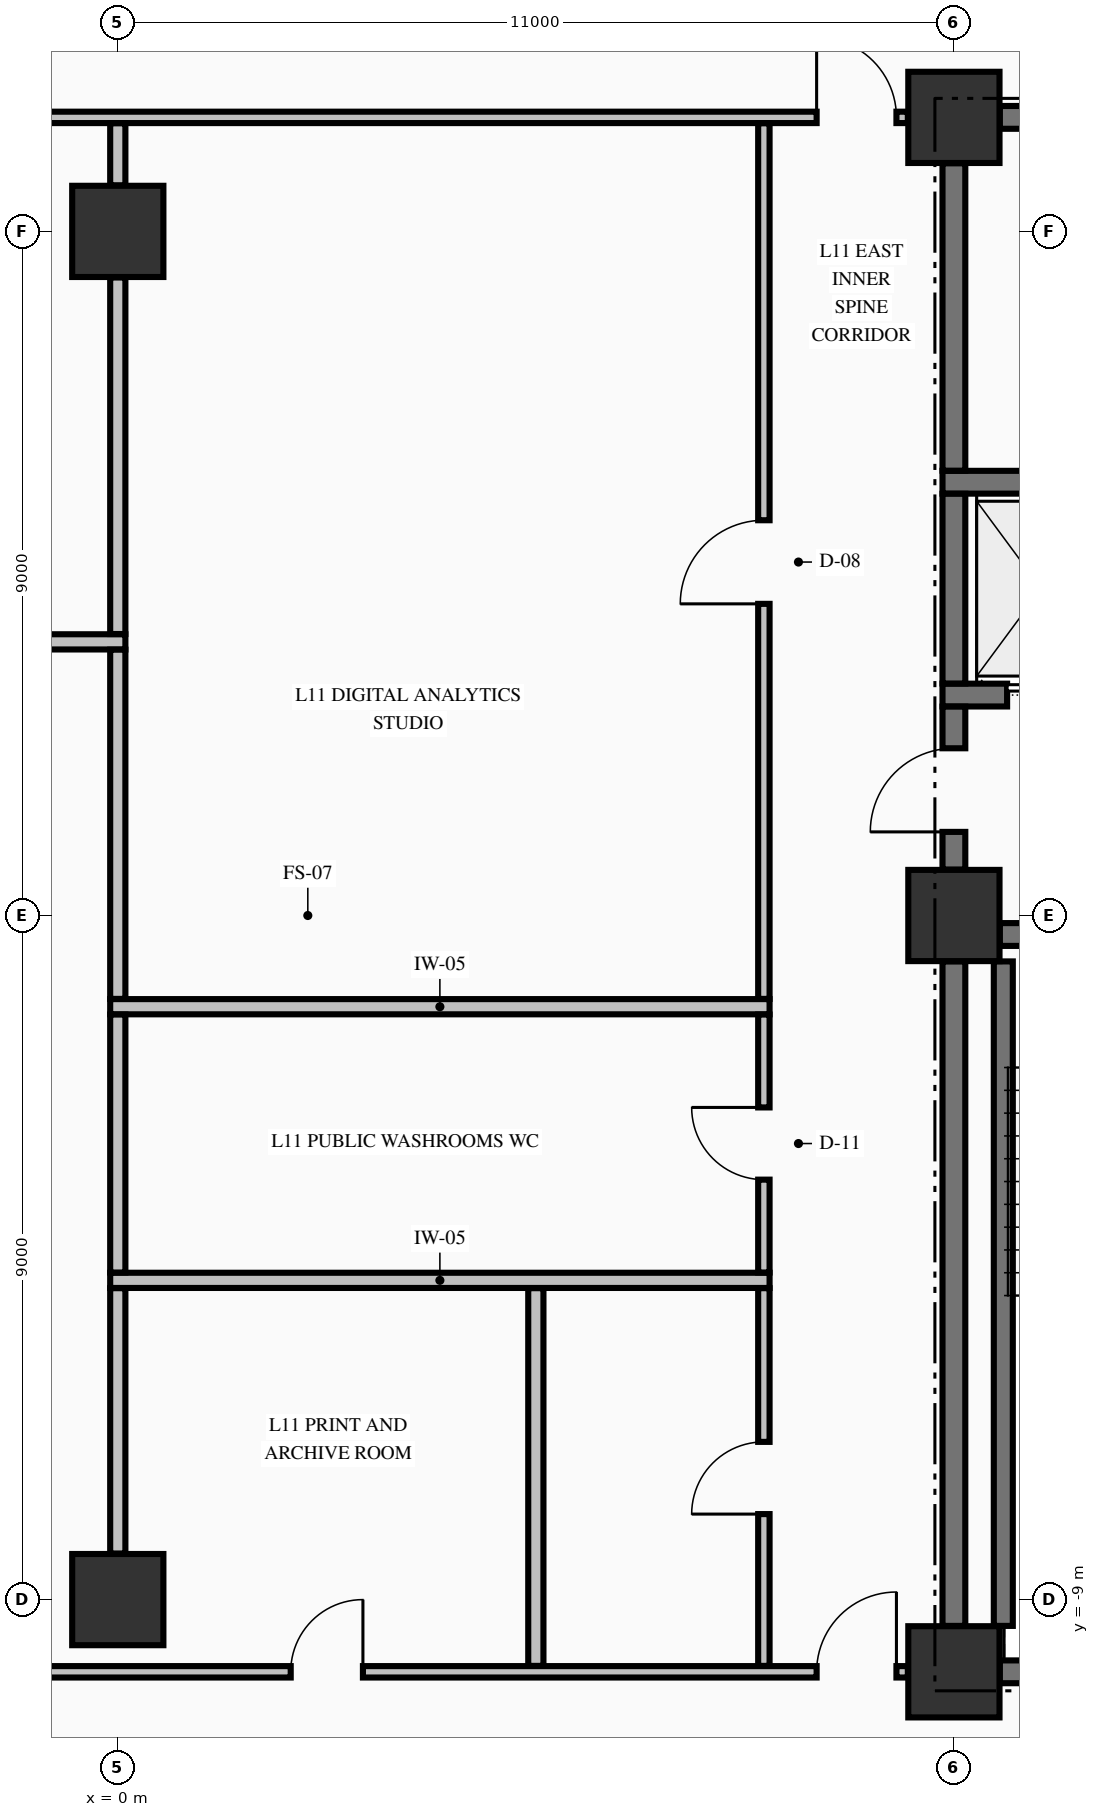
"""IFC4 building model, lengths in metres.
Left out: names, types, materials, properties, quantities, classifications, styles, units other than length and angle.
Written with IfcOpenShell. Run it as: python <this file> out.ifc"""

import sys

from ifc_helpers import new_model, si_unit, direction, frame, frame_2d, origin, origin_2d, place, context, subcontext, project, spatial, rectangle, extrude, element, fill, save


model = new_model("IFC4")
c1 = context("Model", 3, precision=1e-05, world=origin(), true_north=direction((0.0, 1.0)))
c2 = subcontext(c1, "Body", "Model", "MODEL_VIEW")
j1 = project(units=[si_unit("LENGTHUNIT", "METRE"), si_unit("PLANEANGLEUNIT", "RADIAN")], contexts=[c1])
p1 = place(None, origin())
s1 = spatial("IfcSite", under=j1, at=p1, CompositionType="ELEMENT")
p2 = place(p1, origin())
s2 = spatial("IfcBuilding", under=s1, at=p2, CompositionType="ELEMENT")
p3 = place(p2, frame((0.0, 0.0, 48.62)))
s3 = spatial("IfcBuildingStorey", under=s2, at=p3, CompositionType="ELEMENT", Elevation=48.62)
for number, where, z_axis, x_axis in (
    (1, (11.0, -9.95, -0.25), (0.0, 0.0, 1.0), (1.0, 0.0, 0.0)),
    (2, (11.0, 0.0, -0.25), (0.0, 0.0, 1.0), (1.0, 0.0, 0.0)),
    (3, (11.0, 10.5, -0.25), (0.0, 0.0, 1.0), (1.0, 0.0, 0.0)),
    (4, (0.0, -9.0, -0.25), (0.0, 0.0, 1.0), (1.0, 0.0, 0.0)),
    (5, (0.0, 9.0, -0.25), (0.0, 0.0, 1.0), (1.0, 0.0, 0.0)),
):
    element("IfcColumn", number, at=place(p3, frame(where, z_axis=z_axis, x_axis=x_axis)), inside=s3, PredefinedType="COLUMN", context=c2, shape_type="SweptSolid", body=[
        extrude(rectangle(XDim=1.2, YDim=1.2, at=origin_2d()), origin(), (0.0, 0.0, 1.0), 3.395),
    ])
p4 = place(p3, frame((11.604, -9.95, 0.0), z_axis=(0.0, 0.0, 1.0), x_axis=(1.0, 0.0, 0.0)))
e6 = element("IfcWall", 6, at=p4, inside=s3, PredefinedType="SHEAR", context=c2, shape_type="SweptSolid", body=[
    extrude(rectangle(XDim=3.096, YDim=0.3, at=frame_2d((1.548, 0.0))), origin(), (0.0, 0.0, 1.0), 3.145),
])
p5 = place(p3, frame((11.604, -0.25, 0.0), z_axis=(0.0, 0.0, 1.0), x_axis=(1.0, 0.0, 0.0)))
e7 = element("IfcWall", 7, at=p5, inside=s3, PredefinedType="SHEAR", context=c2, shape_type="SweptSolid", body=[
    extrude(rectangle(XDim=3.271, YDim=0.3, at=frame_2d((1.635, 0.0))), origin(), (0.0, 0.0, 1.0), 3.145),
])
p6 = place(p5, frame((0.996, 0.0, 0.0)))
e8 = element("IfcOpeningElement", 8, at=p6, cuts=e7, PredefinedType="OPENING", context=c2, shape_type="SweptSolid", body=[
    extrude(rectangle(XDim=1.1, YDim=2.15, at=frame_2d((0.55, 1.075))), frame((0.0, 0.16, 0.0), z_axis=(0.0, -1.0, 0.0), x_axis=(1.0, 0.0, 0.0)), (0.0, 0.0, 1.0), 0.32),
])
p7 = place(p3, frame((10.85, 2.9, 0.0), z_axis=(0.0, 0.0, 1.0), x_axis=(1.0, 0.0, 0.0)))
e9 = element("IfcWall", 9, at=p7, inside=s3, PredefinedType="SHEAR", context=c2, shape_type="SweptSolid", body=[
    extrude(rectangle(XDim=4.025, YDim=0.3, at=frame_2d((2.012, 0.0))), origin(), (0.0, 0.0, 1.0), 3.145),
])
p8 = place(p7, frame((0.85, 0.0, 0.0)))
e10 = element("IfcOpeningElement", 10, at=p8, cuts=e9, PredefinedType="OPENING", context=c2, shape_type="SweptSolid", body=[
    extrude(rectangle(XDim=1.1, YDim=2.2, at=frame_2d((0.55, 1.1))), frame((0.0, 0.16, 0.0), z_axis=(0.0, -1.0, 0.0), x_axis=(1.0, 0.0, 0.0)), (0.0, 0.0, 1.0), 0.32),
])
p9 = place(p3, frame((10.85, 5.7, 0.0), z_axis=(0.0, 0.0, 1.0), x_axis=(1.0, 0.0, 0.0)))
e11 = element("IfcWall", 11, at=p9, inside=s3, PredefinedType="SHEAR", context=c2, shape_type="SweptSolid", body=[
    extrude(rectangle(XDim=4.025, YDim=0.3, at=frame_2d((2.012, 0.0))), origin(), (0.0, 0.0, 1.0), 3.145),
])
p10 = place(p3, frame((11.604, 10.5, 0.0), z_axis=(0.0, 0.0, 1.0), x_axis=(1.0, 0.0, 0.0)))
e12 = element("IfcWall", 12, at=p10, inside=s3, PredefinedType="SHEAR", context=c2, shape_type="SweptSolid", body=[
    extrude(rectangle(XDim=3.096, YDim=0.3, at=frame_2d((1.548, 0.0))), origin(), (0.0, 0.0, 1.0), 3.145),
])
p11 = place(p10, frame((1.371, 0.0, 0.0)))
e13 = element("IfcOpeningElement", 13, at=p11, cuts=e12, PredefinedType="OPENING", context=c2, shape_type="SweptSolid", body=[
    extrude(rectangle(XDim=0.95, YDim=2.15, at=frame_2d((0.475, 1.075))), frame((0.0, 0.16, 0.0), z_axis=(0.0, -1.0, 0.0), x_axis=(1.0, 0.0, 0.0)), (0.0, 0.0, 1.0), 0.32),
])
p12 = place(p3, frame((-10.394, -9.95, 0.0), z_axis=(0.0, 0.0, 1.0), x_axis=(1.0, 0.0, 0.0)))
e14 = element("IfcWall", 14, at=p12, inside=s3, PredefinedType="PARTITIONING", context=c2, shape_type="SweptSolid", body=[
    extrude(rectangle(XDim=20.788, YDim=0.15, at=frame_2d((10.394, 0.0))), origin(), (0.0, 0.0, 1.0), 3.145),
])
p13 = place(p12, frame((0.15, 0.0, 0.0)))
e15 = element("IfcOpeningElement", 15, at=p13, cuts=e14, PredefinedType="OPENING", context=c2, shape_type="SweptSolid", body=[
    extrude(rectangle(XDim=1.05, YDim=2.15, at=frame_2d((0.525, 1.075))), frame((0.0, 0.085, 0.0), z_axis=(0.0, -1.0, 0.0), x_axis=(1.0, 0.0, 0.0)), (0.0, 0.0, 1.0), 0.17),
])
p14 = place(p12, frame((19.588, 0.0, 0.0)))
e16 = element("IfcOpeningElement", 16, at=p14, cuts=e14, PredefinedType="OPENING", context=c2, shape_type="SweptSolid", body=[
    extrude(rectangle(XDim=1.05, YDim=2.15, at=frame_2d((0.525, 1.075))), frame((0.0, 0.085, 0.0), z_axis=(0.0, -1.0, 0.0), x_axis=(1.0, 0.0, 0.0)), (0.0, 0.0, 1.0), 0.17),
])
p15 = place(p12, frame((12.669, 0.0, 0.0)))
e17 = element("IfcOpeningElement", 17, at=p15, cuts=e14, PredefinedType="OPENING", context=c2, shape_type="SweptSolid", body=[
    extrude(rectangle(XDim=0.95, YDim=2.15, at=frame_2d((0.475, 1.075))), frame((0.0, 0.085, 0.0), z_axis=(0.0, -1.0, 0.0), x_axis=(1.0, 0.0, 0.0)), (0.0, 0.0, 1.0), 0.17),
])
for number, where, z_axis, x_axis in (
    (18, (-0.1, -4.8, 0.0), (0.0, 0.0, 1.0), (1.0, 0.0, 0.0)),
    (19, (-0.1, -1.2, 0.0), (0.0, 0.0, 1.0), (1.0, 0.0, 0.0)),
    (20, (-8.575, 3.6, 0.0), (0.0, 0.0, 1.0), (1.0, 0.0, 0.0)),
):
    element("IfcWall", number, at=place(p3, frame(where, z_axis=z_axis, x_axis=x_axis)), inside=s3, PredefinedType="PARTITIONING", context=c2, shape_type="SweptSolid", body=[
        extrude(rectangle(XDim=8.675, YDim=0.2, at=frame_2d((4.337, 0.0))), origin(), (0.0, 0.0, 1.0), 3.145),
    ])
p16 = place(p3, frame((-10.394, 10.5, 0.0), z_axis=(0.0, 0.0, 1.0), x_axis=(1.0, 0.0, 0.0)))
e21 = element("IfcWall", 21, at=p16, inside=s3, PredefinedType="PARTITIONING", context=c2, shape_type="SweptSolid", body=[
    extrude(rectangle(XDim=20.788, YDim=0.15, at=frame_2d((10.394, 0.0))), origin(), (0.0, 0.0, 1.0), 3.145),
])
p17 = place(p16, frame((0.15, 0.0, 0.0)))
e22 = element("IfcOpeningElement", 22, at=p17, cuts=e21, PredefinedType="OPENING", context=c2, shape_type="SweptSolid", body=[
    extrude(rectangle(XDim=1.05, YDim=2.15, at=frame_2d((0.525, 1.075))), frame((0.0, 0.085, 0.0), z_axis=(0.0, -1.0, 0.0), x_axis=(1.0, 0.0, 0.0)), (0.0, 0.0, 1.0), 0.17),
])
p18 = place(p16, frame((19.588, 0.0, 0.0)))
e23 = element("IfcOpeningElement", 23, at=p18, cuts=e21, PredefinedType="OPENING", context=c2, shape_type="SweptSolid", body=[
    extrude(rectangle(XDim=1.05, YDim=2.15, at=frame_2d((0.525, 1.075))), frame((0.0, 0.085, 0.0), z_axis=(0.0, -1.0, 0.0), x_axis=(1.0, 0.0, 0.0)), (0.0, 0.0, 1.0), 0.17),
])
p19 = place(p3, frame((11.0, -9.346, 0.0), z_axis=(0.0, 0.0, 1.0), x_axis=(0.0, 1.0, 0.0)))
e24 = element("IfcWall", 24, at=p19, inside=s3, PredefinedType="SHEAR", context=c2, shape_type="SweptSolid", body=[
    extrude(rectangle(XDim=8.742, YDim=0.3, at=frame_2d((4.371, 0.0))), origin(), (0.0, 0.0, 1.0), 3.145),
])
p20 = place(p3, frame((11.0, 0.604, 0.0), z_axis=(0.0, 0.0, 1.0), x_axis=(0.0, 1.0, 0.0)))
e25 = element("IfcWall", 25, at=p20, inside=s3, PredefinedType="SHEAR", context=c2, shape_type="SweptSolid", body=[
    extrude(rectangle(XDim=2.144, YDim=0.3, at=frame_2d((1.072, 0.0))), origin(), (0.0, 0.0, 1.0), 3.145),
])
p21 = place(p20, frame((0.496, 0.0, 0.0)))
e26 = element("IfcOpeningElement", 26, at=p21, cuts=e25, PredefinedType="OPENING", context=c2, shape_type="SweptSolid", body=[
    extrude(rectangle(XDim=1.1, YDim=2.15, at=frame_2d((0.55, 1.075))), frame((0.0, 0.16, 0.0), z_axis=(0.0, -1.0, 0.0), x_axis=(1.0, 0.0, 0.0)), (0.0, 0.0, 1.0), 0.32),
])
p22 = place(p3, frame((11.0, 3.052, 0.0), z_axis=(0.0, 0.0, 1.0), x_axis=(0.0, 1.0, 0.0)))
e27 = element("IfcWall", 27, at=p22, inside=s3, PredefinedType="SHEAR", context=c2, shape_type="SweptSolid", body=[
    extrude(rectangle(XDim=2.496, YDim=0.3, at=frame_2d((1.248, 0.0))), origin(), (0.0, 0.0, 1.0), 3.145),
])
p23 = place(p3, frame((11.0, 5.852, 0.0), z_axis=(0.0, 0.0, 1.0), x_axis=(0.0, 1.0, 0.0)))
e28 = element("IfcWall", 28, at=p23, inside=s3, PredefinedType="SHEAR", context=c2, shape_type="SweptSolid", body=[
    extrude(rectangle(XDim=4.044, YDim=0.3, at=frame_2d((2.022, 0.0))), origin(), (0.0, 0.0, 1.0), 3.145),
])
p24 = place(p3, frame((11.65, -9.346, 0.0), z_axis=(0.0, 0.0, 1.0), x_axis=(0.0, 1.0, 0.0)))
e29 = element("IfcWall", 29, at=p24, inside=s3, PredefinedType="SOLIDWALL", context=c2, shape_type="SweptSolid", body=[
    extrude(rectangle(XDim=8.742, YDim=0.25, at=frame_2d((4.371, 0.0))), origin(), (0.0, 0.0, 1.0), 3.145),
])
p25 = place(p3, frame((0.0, -8.394, 0.0), z_axis=(0.0, 0.0, 1.0), x_axis=(0.0, 1.0, 0.0)))
e30 = element("IfcWall", 30, at=p25, inside=s3, PredefinedType="PARTITIONING", context=c2, shape_type="SweptSolid", body=[
    extrude(rectangle(XDim=3.491, YDim=0.2, at=frame_2d((1.746, 0.0))), origin(), (0.0, 0.0, 1.0), 2.485),
])
p26 = place(p3, frame((0.0, -4.697, 0.0), z_axis=(0.0, 0.0, 1.0), x_axis=(0.0, 1.0, 0.0)))
e31 = element("IfcWall", 31, at=p26, inside=s3, PredefinedType="PARTITIONING", context=c2, shape_type="SweptSolid", body=[
    extrude(rectangle(XDim=3.394, YDim=0.2, at=frame_2d((1.697, 0.0))), origin(), (0.0, 0.0, 1.0), 2.485),
])
p27 = place(p3, frame((0.0, -1.097, 0.0), z_axis=(0.0, 0.0, 1.0), x_axis=(0.0, 1.0, 0.0)))
e32 = element("IfcWall", 32, at=p27, inside=s3, PredefinedType="PARTITIONING", context=c2, shape_type="SweptSolid", body=[
    extrude(rectangle(XDim=4.594, YDim=0.2, at=frame_2d((2.297, 0.0))), origin(), (0.0, 0.0, 1.0), 2.485),
])
p28 = place(p3, frame((0.0, 3.703, 0.0), z_axis=(0.0, 0.0, 1.0), x_axis=(0.0, 1.0, 0.0)))
e33 = element("IfcWall", 33, at=p28, inside=s3, PredefinedType="PARTITIONING", context=c2, shape_type="SweptSolid", body=[
    extrude(rectangle(XDim=4.691, YDim=0.2, at=frame_2d((2.346, 0.0))), origin(), (0.0, 0.0, 1.0), 2.485),
])
p29 = place(p3, frame((0.0, 9.606, 0.0), z_axis=(0.0, 0.0, 1.0), x_axis=(0.0, 1.0, 0.0)))
e34 = element("IfcWall", 34, at=p29, inside=s3, PredefinedType="PARTITIONING", context=c2, shape_type="SweptSolid", body=[
    extrude(rectangle(XDim=0.816, YDim=0.2, at=frame_2d((0.408, 0.0))), origin(), (0.0, 0.0, 1.0), 2.485),
])
p30 = place(p3, frame((5.5, -9.872, 0.0), z_axis=(0.0, 0.0, 1.0), x_axis=(0.0, 1.0, 0.0)))
e35 = element("IfcWall", 35, at=p30, inside=s3, PredefinedType="PARTITIONING", context=c2, shape_type="SweptSolid", body=[
    extrude(rectangle(XDim=4.969, YDim=0.2, at=frame_2d((2.484, 0.0))), origin(), (0.0, 0.0, 1.0), 3.145),
])
p31 = place(p3, frame((8.5, -9.872, 0.0), z_axis=(0.0, 0.0, 1.0), x_axis=(0.0, 1.0, 0.0)))
e36 = element("IfcWall", 36, at=p31, inside=s3, PredefinedType="PARTITIONING", context=c2, shape_type="SweptSolid", body=[
    extrude(rectangle(XDim=4.969, YDim=0.15, at=frame_2d((2.484, 0.0))), origin(), (0.0, 0.0, 1.0), 3.145),
])
p32 = place(p31, frame((1.997, 0.0, 0.0)))
e37 = element("IfcOpeningElement", 37, at=p32, cuts=e36, PredefinedType="OPENING", context=c2, shape_type="SweptSolid", body=[
    extrude(rectangle(XDim=0.95, YDim=2.15, at=frame_2d((0.475, 1.075))), frame((0.0, 0.085, 0.0), z_axis=(0.0, -1.0, 0.0), x_axis=(1.0, 0.0, 0.0)), (0.0, 0.0, 1.0), 0.17),
])
p33 = place(p3, frame((8.5, -4.697, 0.0), z_axis=(0.0, 0.0, 1.0), x_axis=(0.0, 1.0, 0.0)))
e38 = element("IfcWall", 38, at=p33, inside=s3, PredefinedType="PARTITIONING", context=c2, shape_type="SweptSolid", body=[
    extrude(rectangle(XDim=3.394, YDim=0.15, at=frame_2d((1.697, 0.0))), origin(), (0.0, 0.0, 1.0), 3.145),
])
p34 = place(p33, frame((1.222, 0.0, 0.0)))
e39 = element("IfcOpeningElement", 39, at=p34, cuts=e38, PredefinedType="OPENING", context=c2, shape_type="SweptSolid", body=[
    extrude(rectangle(XDim=0.95, YDim=2.15, at=frame_2d((0.475, 1.075))), frame((0.0, 0.085, 0.0), z_axis=(0.0, -1.0, 0.0), x_axis=(1.0, 0.0, 0.0)), (0.0, 0.0, 1.0), 0.17),
])
p35 = place(p3, frame((8.5, -1.097, 0.0), z_axis=(0.0, 0.0, 1.0), x_axis=(0.0, 1.0, 0.0)))
e40 = element("IfcWall", 40, at=p35, inside=s3, PredefinedType="PARTITIONING", context=c2, shape_type="SweptSolid", body=[
    extrude(rectangle(XDim=11.519, YDim=0.15, at=frame_2d((5.76, 0.0))), origin(), (0.0, 0.0, 1.0), 3.145),
])
p36 = place(p35, frame((5.197, 0.0, 0.0)))
e41 = element("IfcOpeningElement", 41, at=p36, cuts=e40, PredefinedType="OPENING", context=c2, shape_type="SweptSolid", body=[
    extrude(rectangle(XDim=1.1, YDim=2.15, at=frame_2d((0.55, 1.075))), frame((0.0, 0.085, 0.0), z_axis=(0.0, -1.0, 0.0), x_axis=(1.0, 0.0, 0.0)), (0.0, 0.0, 1.0), 0.17),
])
p37 = place(p21, origin())
e42 = element("IfcDoor", 42, at=p37, inside=s3, OperationType="SINGLE_SWING_LEFT", PredefinedType="DOOR", context=c2, shape_type="SweptSolid", body=[
    extrude(rectangle(XDim=1.1, YDim=2.15, at=frame_2d((0.55, 1.075))), frame((0.0, 0.025, 0.0), z_axis=(0.0, -1.0, 0.0), x_axis=(1.0, 0.0, 0.0)), (0.0, 0.0, 1.0), 0.05),
])
fill(e26, e42)
p38 = place(p8, origin())
e43 = element("IfcDoor", 43, at=p38, inside=s3, OperationType="SLIDING_TO_RIGHT", PredefinedType="DOOR", context=c2, shape_type="SweptSolid", body=[
    extrude(rectangle(XDim=1.1, YDim=2.2, at=frame_2d((0.55, 1.1))), frame((0.0, 0.025, 0.0), z_axis=(0.0, -1.0, 0.0), x_axis=(1.0, 0.0, 0.0)), (0.0, 0.0, 1.0), 0.05),
])
fill(e10, e43)
p39 = place(p18, origin())
e44 = element("IfcDoor", 44, at=p39, inside=s3, OperationType="SINGLE_SWING_LEFT", PredefinedType="DOOR", context=c2, shape_type="SweptSolid", body=[
    extrude(rectangle(XDim=1.05, YDim=2.15, at=frame_2d((0.525, 1.075))), frame((0.0, 0.025, 0.0), z_axis=(0.0, -1.0, 0.0), x_axis=(1.0, 0.0, 0.0)), (0.0, 0.0, 1.0), 0.05),
])
fill(e23, e44)
p40 = place(p14, origin())
e45 = element("IfcDoor", 45, at=p40, inside=s3, OperationType="SINGLE_SWING_RIGHT", PredefinedType="DOOR", context=c2, shape_type="SweptSolid", body=[
    extrude(rectangle(XDim=1.05, YDim=2.15, at=frame_2d((0.525, 1.075))), frame((0.0, 0.025, 0.0), z_axis=(0.0, -1.0, 0.0), x_axis=(1.0, 0.0, 0.0)), (0.0, 0.0, 1.0), 0.05),
])
fill(e16, e45)
p41 = place(p36, origin())
e46 = element("IfcDoor", 46, at=p41, inside=s3, OperationType="SINGLE_SWING_LEFT", PredefinedType="DOOR", context=c2, shape_type="SweptSolid", body=[
    extrude(rectangle(XDim=1.1, YDim=2.15, at=frame_2d((0.55, 1.075))), frame((0.0, 0.025, 0.0), z_axis=(0.0, -1.0, 0.0), x_axis=(1.0, 0.0, 0.0)), (0.0, 0.0, 1.0), 0.05),
])
fill(e41, e46)
p42 = place(p34, origin())
e47 = element("IfcDoor", 47, at=p42, inside=s3, OperationType="SINGLE_SWING_RIGHT", PredefinedType="DOOR", context=c2, shape_type="SweptSolid", body=[
    extrude(rectangle(XDim=0.95, YDim=2.15, at=frame_2d((0.475, 1.075))), frame((0.0, 0.025, 0.0), z_axis=(0.0, -1.0, 0.0), x_axis=(1.0, 0.0, 0.0)), (0.0, 0.0, 1.0), 0.05),
])
fill(e39, e47)
p43 = place(p32, origin())
e48 = element("IfcDoor", 48, at=p43, inside=s3, OperationType="SINGLE_SWING_LEFT", PredefinedType="DOOR", context=c2, shape_type="SweptSolid", body=[
    extrude(rectangle(XDim=0.95, YDim=2.15, at=frame_2d((0.475, 1.075))), frame((0.0, 0.025, 0.0), z_axis=(0.0, -1.0, 0.0), x_axis=(1.0, 0.0, 0.0)), (0.0, 0.0, 1.0), 0.05),
])
fill(e37, e48)
p44 = place(p15, origin())
e49 = element("IfcDoor", 49, at=p44, inside=s3, OperationType="SINGLE_SWING_RIGHT", PredefinedType="DOOR", context=c2, shape_type="SweptSolid", body=[
    extrude(rectangle(XDim=0.95, YDim=2.15, at=frame_2d((0.475, 1.075))), frame((0.0, 0.025, 0.0), z_axis=(0.0, -1.0, 0.0), x_axis=(1.0, 0.0, 0.0)), (0.0, 0.0, 1.0), 0.05),
])
fill(e17, e49)
save(model, sys.argv[1])
